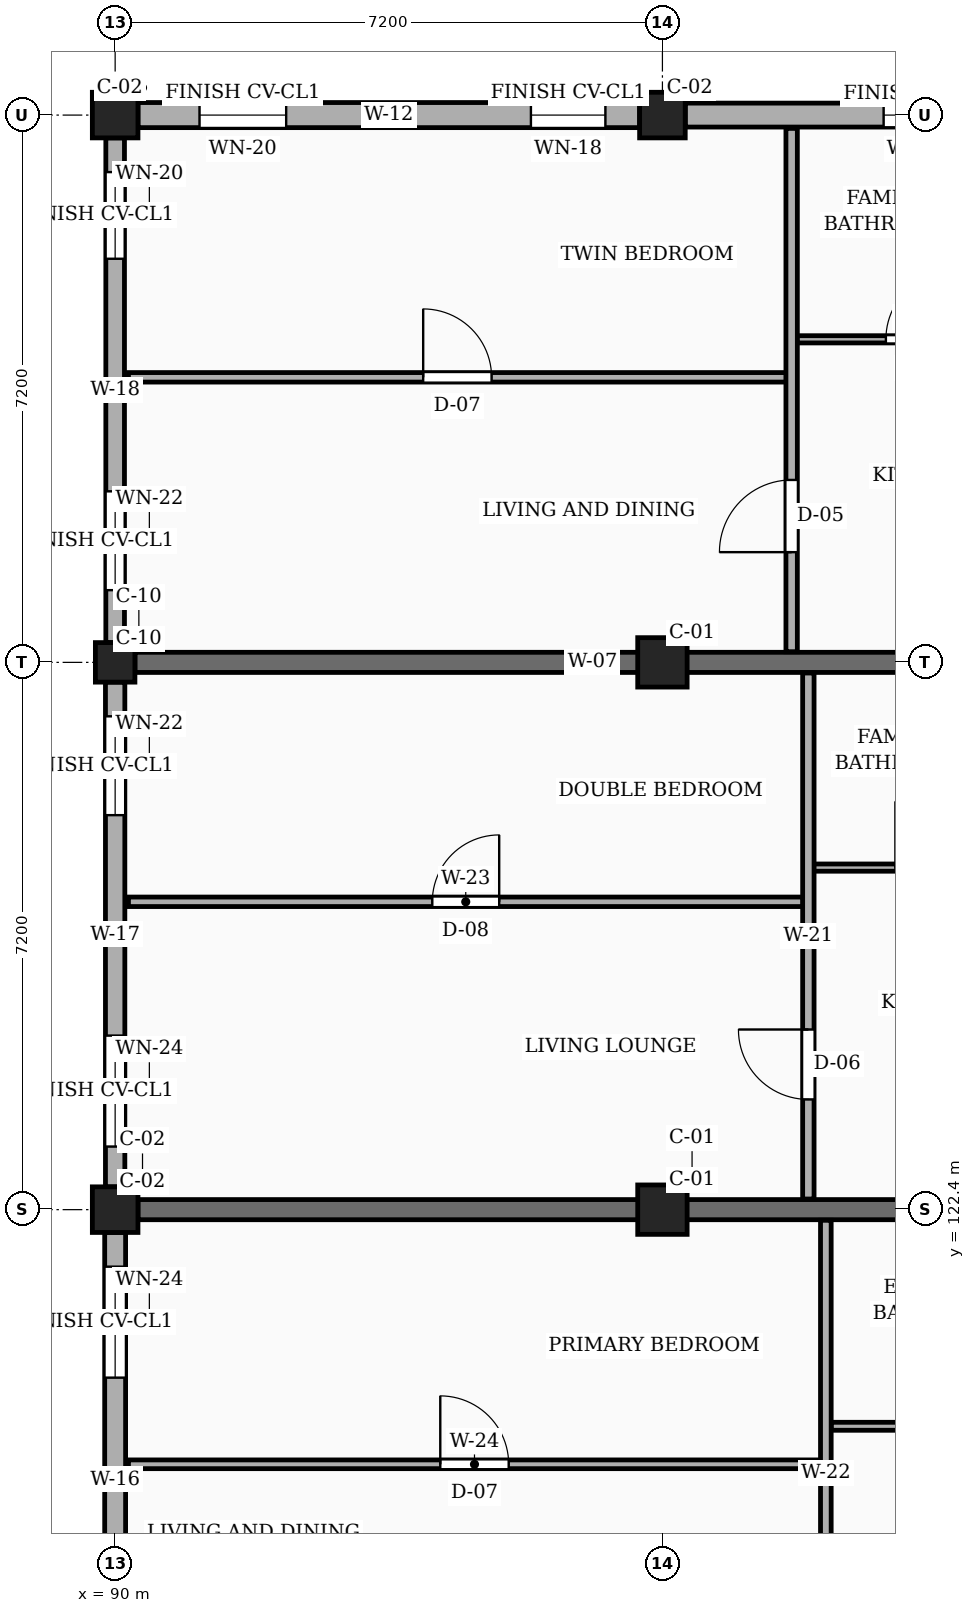
"""IFC4 building model, lengths in metres.
Left out: names, types, materials, properties, quantities, classifications, styles, units other than length and angle.
Written with IfcOpenShell. Run it as: python <this file> out.ifc"""

import sys

from ifc_helpers import new_model, si_unit, direction, frame, frame_2d, origin, origin_2d, place, context, subcontext, project, spatial, rectangle, circle, extrude, element, fill, save


model = new_model("IFC4")
c1 = context("Model", 3, precision=1e-05, world=origin(), true_north=direction((0.0, 1.0)))
c2 = subcontext(c1, "Body", "Model", "MODEL_VIEW")
j1 = project(units=[si_unit("LENGTHUNIT", "METRE"), si_unit("PLANEANGLEUNIT", "RADIAN")], contexts=[c1])
p1 = place(None, origin())
s1 = spatial("IfcSite", under=j1, at=p1, CompositionType="ELEMENT")
p2 = place(p1, origin())
s2 = spatial("IfcBuilding", under=s1, at=p2, CompositionType="ELEMENT")
p3 = place(p2, origin())
s3 = spatial("IfcBuildingStorey", under=s2, at=p3, CompositionType="ELEMENT", Elevation=0.0)
p4 = place(p3, frame((90.0, 122.4, 0.0), z_axis=(0.0, 0.0, 1.0), x_axis=(1.0, 0.0, 0.0)))
e1 = element("IfcColumn", 1, at=p4, inside=s3, PredefinedType="COLUMN", context=c2, shape_type="SweptSolid", body=[
    extrude(rectangle(XDim=0.6, YDim=0.6, at=origin_2d()), origin(), (0.0, 0.0, 1.0), 4.5),
])
p5 = place(p3, frame((90.0, 129.6, 0.0), z_axis=(0.0, 0.0, 1.0), x_axis=(1.0, 0.0, 0.0)))
e2 = element("IfcColumn", 2, at=p5, inside=s3, PredefinedType="COLUMN", context=c2, shape_type="SweptSolid", body=[
    extrude(circle(Radius=0.26, at=origin_2d()), origin(), (0.0, 0.0, 1.0), 4.5),
])
p6 = place(p3, frame((90.0, 136.8, 0.0), z_axis=(0.0, 0.0, 1.0), x_axis=(1.0, 0.0, 0.0)))
e3 = element("IfcColumn", 3, at=p6, inside=s3, PredefinedType="COLUMN", context=c2, shape_type="SweptSolid", body=[
    extrude(rectangle(XDim=0.6, YDim=0.6, at=origin_2d()), origin(), (0.0, 0.0, 1.0), 4.5),
])
for number, where, z_axis, x_axis in (
    (4, (97.2, 122.4, 0.0), (0.0, 0.0, 1.0), (1.0, 0.0, 0.0)),
    (5, (97.2, 129.6, 0.0), (0.0, 0.0, 1.0), (1.0, 0.0, 0.0)),
):
    element("IfcColumn", number, at=place(p3, frame(where, z_axis=z_axis, x_axis=x_axis)), inside=s3, PredefinedType="COLUMN", context=c2, shape_type="SweptSolid", body=[
        extrude(rectangle(XDim=0.65, YDim=0.65, at=origin_2d()), origin(), (0.0, 0.0, 1.0), 4.5),
    ])
p7 = place(p3, frame((97.2, 136.8, 0.0), z_axis=(0.0, 0.0, 1.0), x_axis=(1.0, 0.0, 0.0)))
e6 = element("IfcColumn", 6, at=p7, inside=s3, PredefinedType="COLUMN", context=c2, shape_type="SweptSolid", body=[
    extrude(rectangle(XDim=0.6, YDim=0.6, at=origin_2d()), origin(), (0.0, 0.0, 1.0), 4.5),
])
p8 = place(p3, frame((90.3, 122.4, 0.0), z_axis=(0.0, 0.0, 1.0), x_axis=(1.0, 0.0, 0.0)))
e7 = element("IfcWall", 7, at=p8, inside=s3, PredefinedType="SOLIDWALL", context=c2, shape_type="SweptSolid", body=[
    extrude(rectangle(XDim=12.0, YDim=0.265, at=frame_2d((6.0, 0.0))), origin(), (0.0, 0.0, 1.0), 3.54),
])
p9 = place(p3, frame((90.26, 129.6, 0.0), z_axis=(0.0, 0.0, 1.0), x_axis=(1.0, 0.0, 0.0)))
e8 = element("IfcWall", 8, at=p9, inside=s3, PredefinedType="SOLIDWALL", context=c2, shape_type="SweptSolid", body=[
    extrude(rectangle(XDim=12.04, YDim=0.265, at=frame_2d((6.02, 0.0))), origin(), (0.0, 0.0, 1.0), 3.54),
])
p10 = place(p3, frame((104.1, 136.8, 0.0), z_axis=(0.0, 0.0, 1.0), x_axis=(-1.0, 0.0, 0.0)))
e9 = element("IfcWall", 9, at=p10, inside=s3, PredefinedType="SOLIDWALL", context=c2, shape_type="SweptSolid", body=[
    extrude(rectangle(XDim=6.6, YDim=0.315, at=frame_2d((3.3, 0.0))), origin(), (0.0, 0.0, 1.0), 3.81),
])
p11 = place(p10, frame((0.45, 0.0, 0.78)))
e10 = element("IfcOpeningElement", 10, at=p11, cuts=e9, PredefinedType="OPENING", context=c2, shape_type="SweptSolid", body=[
    extrude(rectangle(XDim=1.04, YDim=1.26, at=frame_2d((0.52, 0.63))), frame((0.0, 0.167, 0.0), z_axis=(0.0, -1.0, 0.0), x_axis=(1.0, 0.0, 0.0)), (0.0, 0.0, 1.0), 0.335),
])
p12 = place(p10, frame((3.01, 0.0, 0.78)))
e11 = element("IfcOpeningElement", 11, at=p12, cuts=e9, PredefinedType="OPENING", context=c2, shape_type="SweptSolid", body=[
    extrude(rectangle(XDim=0.98, YDim=1.36, at=frame_2d((0.49, 0.68))), frame((0.0, 0.167, 0.0), z_axis=(0.0, -1.0, 0.0), x_axis=(1.0, 0.0, 0.0)), (0.0, 0.0, 1.0), 0.335),
])
p13 = place(p3, frame((96.9, 136.8, 0.0), z_axis=(0.0, 0.0, 1.0), x_axis=(-1.0, 0.0, 0.0)))
e12 = element("IfcWall", 12, at=p13, inside=s3, PredefinedType="SOLIDWALL", context=c2, shape_type="SweptSolid", body=[
    extrude(rectangle(XDim=6.6, YDim=0.33, at=frame_2d((3.3, 0.0))), origin(), (0.0, 0.0, 1.0), 3.81),
])
p14 = place(p13, frame((0.45, 0.0, 0.78)))
e13 = element("IfcOpeningElement", 13, at=p14, cuts=e12, PredefinedType="OPENING", context=c2, shape_type="SweptSolid", body=[
    extrude(rectangle(XDim=0.98, YDim=1.36, at=frame_2d((0.49, 0.68))), frame((0.0, 0.175, 0.0), z_axis=(0.0, -1.0, 0.0), x_axis=(1.0, 0.0, 0.0)), (0.0, 0.0, 1.0), 0.35),
])
p15 = place(p13, frame((4.65, 0.0, 0.78)))
e14 = element("IfcOpeningElement", 14, at=p15, cuts=e12, PredefinedType="OPENING", context=c2, shape_type="SweptSolid", body=[
    extrude(rectangle(XDim=1.14, YDim=1.36, at=frame_2d((0.57, 0.68))), frame((0.0, 0.175, 0.0), z_axis=(0.0, -1.0, 0.0), x_axis=(1.0, 0.0, 0.0)), (0.0, 0.0, 1.0), 0.35),
])
p16 = place(p3, frame((90.0, 136.5, 0.0), z_axis=(0.0, 0.0, 1.0), x_axis=(0.0, -1.0, 0.0)))
e15 = element("IfcWall", 15, at=p16, inside=s3, PredefinedType="SOLIDWALL", context=c2, shape_type="SweptSolid", body=[
    extrude(rectangle(XDim=6.64, YDim=0.245, at=frame_2d((3.32, 0.0))), origin(), (0.0, 0.0, 1.0), 3.81),
])
p17 = place(p16, frame((0.45, 0.0, 0.78)))
e16 = element("IfcOpeningElement", 16, at=p17, cuts=e15, PredefinedType="OPENING", context=c2, shape_type="SweptSolid", body=[
    extrude(rectangle(XDim=1.14, YDim=1.36, at=frame_2d((0.57, 0.68))), frame((0.0, 0.133, 0.0), z_axis=(0.0, -1.0, 0.0), x_axis=(1.0, 0.0, 0.0)), (0.0, 0.0, 1.0), 0.265),
])
p18 = place(p16, frame((4.65, 0.0, 0.78)))
e17 = element("IfcOpeningElement", 17, at=p18, cuts=e15, PredefinedType="OPENING", context=c2, shape_type="SweptSolid", body=[
    extrude(rectangle(XDim=1.3, YDim=1.36, at=frame_2d((0.65, 0.68))), frame((0.0, 0.133, 0.0), z_axis=(0.0, -1.0, 0.0), x_axis=(1.0, 0.0, 0.0)), (0.0, 0.0, 1.0), 0.265),
])
p19 = place(p3, frame((90.0, 129.34, 0.0), z_axis=(0.0, 0.0, 1.0), x_axis=(0.0, -1.0, 0.0)))
e18 = element("IfcWall", 18, at=p19, inside=s3, PredefinedType="SOLIDWALL", context=c2, shape_type="SweptSolid", body=[
    extrude(rectangle(XDim=6.64, YDim=0.255, at=frame_2d((3.32, 0.0))), origin(), (0.0, 0.0, 1.0), 3.81),
])
p20 = place(p19, frame((0.45, 0.0, 0.78)))
e19 = element("IfcOpeningElement", 19, at=p20, cuts=e18, PredefinedType="OPENING", context=c2, shape_type="SweptSolid", body=[
    extrude(rectangle(XDim=1.3, YDim=1.36, at=frame_2d((0.65, 0.68))), frame((0.0, 0.137, 0.0), z_axis=(0.0, -1.0, 0.0), x_axis=(1.0, 0.0, 0.0)), (0.0, 0.0, 1.0), 0.275),
])
p21 = place(p19, frame((4.65, 0.0, 0.78)))
e20 = element("IfcOpeningElement", 20, at=p21, cuts=e18, PredefinedType="OPENING", context=c2, shape_type="SweptSolid", body=[
    extrude(rectangle(XDim=1.46, YDim=1.36, at=frame_2d((0.73, 0.68))), frame((0.0, 0.137, 0.0), z_axis=(0.0, -1.0, 0.0), x_axis=(1.0, 0.0, 0.0)), (0.0, 0.0, 1.0), 0.275),
])
p22 = place(p3, frame((90.0, 122.1, 0.0), z_axis=(0.0, 0.0, 1.0), x_axis=(0.0, -1.0, 0.0)))
e21 = element("IfcWall", 21, at=p22, inside=s3, PredefinedType="SOLIDWALL", context=c2, shape_type="SweptSolid", body=[
    extrude(rectangle(XDim=6.6, YDim=0.275, at=frame_2d((3.3, 0.0))), origin(), (0.0, 0.0, 1.0), 3.81),
])
p23 = place(p22, frame((0.45, 0.0, 0.78)))
e22 = element("IfcOpeningElement", 22, at=p23, cuts=e21, PredefinedType="OPENING", context=c2, shape_type="SweptSolid", body=[
    extrude(rectangle(XDim=1.46, YDim=1.36, at=frame_2d((0.73, 0.68))), frame((0.0, 0.147, 0.0), z_axis=(0.0, -1.0, 0.0), x_axis=(1.0, 0.0, 0.0)), (0.0, 0.0, 1.0), 0.295),
])
p24 = place(p22, frame((4.65, 0.0, 0.78)))
e23 = element("IfcOpeningElement", 23, at=p24, cuts=e21, PredefinedType="OPENING", context=c2, shape_type="SweptSolid", body=[
    extrude(rectangle(XDim=1.05, YDim=1.44, at=frame_2d((0.525, 0.72))), frame((0.0, 0.147, 0.0), z_axis=(0.0, -1.0, 0.0), x_axis=(1.0, 0.0, 0.0)), (0.0, 0.0, 1.0), 0.295),
])
p25 = place(p3, frame((90.175, 119.05, 0.0), z_axis=(0.0, 0.0, 1.0), x_axis=(1.0, 0.0, 0.0)))
e24 = element("IfcWall", 24, at=p25, inside=s3, PredefinedType="PARTITIONING", context=c2, shape_type="SweptSolid", body=[
    extrude(rectangle(XDim=9.105, YDim=0.115, at=frame_2d((4.552, 0.0))), origin(), (0.0, 0.0, 1.0), 3.675),
])
p26 = place(p25, frame((4.103, 0.0, 0.0)))
e25 = element("IfcOpeningElement", 25, at=p26, cuts=e24, PredefinedType="OPENING", context=c2, shape_type="SweptSolid", body=[
    extrude(rectangle(XDim=0.9, YDim=2.1, at=frame_2d((0.45, 1.05))), frame((0.0, 0.067, 0.0), z_axis=(0.0, -1.0, 0.0), x_axis=(1.0, 0.0, 0.0)), (0.0, 0.0, 1.0), 0.135),
])
p27 = place(p3, frame((99.42, 119.55, 0.0), z_axis=(0.0, 0.0, 1.0), x_axis=(1.0, 0.0, 0.0)))
e26 = element("IfcWall", 26, at=p27, inside=s3, PredefinedType="PARTITIONING", context=c2, shape_type="SweptSolid", body=[
    extrude(rectangle(XDim=2.79, YDim=0.105, at=frame_2d((1.395, 0.0))), origin(), (0.0, 0.0, 1.0), 3.675),
])
p28 = place(p27, frame((0.945, 0.0, 0.0)))
e27 = element("IfcOpeningElement", 27, at=p28, cuts=e26, PredefinedType="OPENING", context=c2, shape_type="SweptSolid", body=[
    extrude(rectangle(XDim=0.9, YDim=2.05, at=frame_2d((0.45, 1.025))), frame((0.0, 0.062, 0.0), z_axis=(0.0, -1.0, 0.0), x_axis=(1.0, 0.0, 0.0)), (0.0, 0.0, 1.0), 0.125),
])
p29 = place(p3, frame((99.35, 115.34, 0.0), z_axis=(0.0, 0.0, 1.0), x_axis=(0.0, 1.0, 0.0)))
e28 = element("IfcWall", 28, at=p29, inside=s3, PredefinedType="PARTITIONING", context=c2, shape_type="SweptSolid", body=[
    extrude(rectangle(XDim=6.92, YDim=0.14, at=frame_2d((3.46, 0.0))), origin(), (0.0, 0.0, 1.0), 3.675),
])
p30 = place(p29, frame((1.31, 0.0, 0.0)))
e29 = element("IfcOpeningElement", 29, at=p30, cuts=e28, PredefinedType="OPENING", context=c2, shape_type="SweptSolid", body=[
    extrude(rectangle(XDim=0.95, YDim=2.1, at=frame_2d((0.475, 1.05))), frame((0.0, 0.08, 0.0), z_axis=(0.0, -1.0, 0.0), x_axis=(1.0, 0.0, 0.0)), (0.0, 0.0, 1.0), 0.16),
])
p31 = place(p3, frame((90.175, 126.45, 0.0), z_axis=(0.0, 0.0, 1.0), x_axis=(1.0, 0.0, 0.0)))
e30 = element("IfcWall", 30, at=p31, inside=s3, PredefinedType="PARTITIONING", context=c2, shape_type="SweptSolid", body=[
    extrude(rectangle(XDim=8.875, YDim=0.125, at=frame_2d((4.438, 0.0))), origin(), (0.0, 0.0, 1.0), 3.675),
])
p32 = place(p31, frame((3.998, 0.0, 0.0)))
e31 = element("IfcOpeningElement", 31, at=p32, cuts=e30, PredefinedType="OPENING", context=c2, shape_type="SweptSolid", body=[
    extrude(rectangle(XDim=0.88, YDim=2.08, at=frame_2d((0.44, 1.04))), frame((0.0, 0.073, 0.0), z_axis=(0.0, -1.0, 0.0), x_axis=(1.0, 0.0, 0.0)), (0.0, 0.0, 1.0), 0.145),
])
p33 = place(p3, frame((99.19, 126.9, 0.0), z_axis=(0.0, 0.0, 1.0), x_axis=(1.0, 0.0, 0.0)))
e32 = element("IfcWall", 32, at=p33, inside=s3, PredefinedType="PARTITIONING", context=c2, shape_type="SweptSolid", body=[
    extrude(rectangle(XDim=3.02, YDim=0.095, at=frame_2d((1.51, 0.0))), origin(), (0.0, 0.0, 1.0), 3.675),
])
p34 = place(p33, frame((1.075, 0.0, 0.0)))
e33 = element("IfcOpeningElement", 33, at=p34, cuts=e32, PredefinedType="OPENING", context=c2, shape_type="SweptSolid", body=[
    extrude(rectangle(XDim=0.87, YDim=2.05, at=frame_2d((0.435, 1.025))), frame((0.0, 0.058, 0.0), z_axis=(0.0, -1.0, 0.0), x_axis=(1.0, 0.0, 0.0)), (0.0, 0.0, 1.0), 0.115),
])
p35 = place(p3, frame((99.12, 122.54, 0.0), z_axis=(0.0, 0.0, 1.0), x_axis=(0.0, 1.0, 0.0)))
e34 = element("IfcWall", 34, at=p35, inside=s3, PredefinedType="PARTITIONING", context=c2, shape_type="SweptSolid", body=[
    extrude(rectangle(XDim=6.92, YDim=0.15, at=frame_2d((3.46, 0.0))), origin(), (0.0, 0.0, 1.0), 3.675),
])
p36 = place(p35, frame((1.31, 0.0, 0.0)))
e35 = element("IfcOpeningElement", 35, at=p36, cuts=e34, PredefinedType="OPENING", context=c2, shape_type="SweptSolid", body=[
    extrude(rectangle(XDim=0.92, YDim=2.1, at=frame_2d((0.46, 1.05))), frame((0.0, 0.085, 0.0), z_axis=(0.0, -1.0, 0.0), x_axis=(1.0, 0.0, 0.0)), (0.0, 0.0, 1.0), 0.17),
])
p37 = place(p3, frame((90.175, 133.35, 0.0), z_axis=(0.0, 0.0, 1.0), x_axis=(1.0, 0.0, 0.0)))
e36 = element("IfcWall", 36, at=p37, inside=s3, PredefinedType="PARTITIONING", context=c2, shape_type="SweptSolid", body=[
    extrude(rectangle(XDim=8.655, YDim=0.125, at=frame_2d((4.328, 0.0))), origin(), (0.0, 0.0, 1.0), 3.675),
])
p38 = place(p37, frame((3.877, 0.0, 0.0)))
e37 = element("IfcOpeningElement", 37, at=p38, cuts=e36, PredefinedType="OPENING", context=c2, shape_type="SweptSolid", body=[
    extrude(rectangle(XDim=0.9, YDim=2.1, at=frame_2d((0.45, 1.05))), frame((0.0, 0.073, 0.0), z_axis=(0.0, -1.0, 0.0), x_axis=(1.0, 0.0, 0.0)), (0.0, 0.0, 1.0), 0.145),
])
p39 = place(p3, frame((98.97, 133.85, 0.0), z_axis=(0.0, 0.0, 1.0), x_axis=(1.0, 0.0, 0.0)))
e38 = element("IfcWall", 38, at=p39, inside=s3, PredefinedType="PARTITIONING", context=c2, shape_type="SweptSolid", body=[
    extrude(rectangle(XDim=3.24, YDim=0.095, at=frame_2d((1.62, 0.0))), origin(), (0.0, 0.0, 1.0), 3.675),
])
p40 = place(p39, frame((1.17, 0.0, 0.0)))
e39 = element("IfcOpeningElement", 39, at=p40, cuts=e38, PredefinedType="OPENING", context=c2, shape_type="SweptSolid", body=[
    extrude(rectangle(XDim=0.9, YDim=2.05, at=frame_2d((0.45, 1.025))), frame((0.0, 0.058, 0.0), z_axis=(0.0, -1.0, 0.0), x_axis=(1.0, 0.0, 0.0)), (0.0, 0.0, 1.0), 0.115),
])
p41 = place(p3, frame((98.9, 129.74, 0.0), z_axis=(0.0, 0.0, 1.0), x_axis=(0.0, 1.0, 0.0)))
e40 = element("IfcWall", 40, at=p41, inside=s3, PredefinedType="PARTITIONING", context=c2, shape_type="SweptSolid", body=[
    extrude(rectangle(XDim=6.885, YDim=0.15, at=frame_2d((3.442, 0.0))), origin(), (0.0, 0.0, 1.0), 3.675),
])
p42 = place(p41, frame((1.31, 0.0, 0.0)))
e41 = element("IfcOpeningElement", 41, at=p42, cuts=e40, PredefinedType="OPENING", context=c2, shape_type="SweptSolid", body=[
    extrude(rectangle(XDim=0.95, YDim=2.1, at=frame_2d((0.475, 1.05))), frame((0.0, 0.085, 0.0), z_axis=(0.0, -1.0, 0.0), x_axis=(1.0, 0.0, 0.0)), (0.0, 0.0, 1.0), 0.17),
])
p43 = place(p12, origin())
e42 = element("IfcWindow", 42, at=p43, inside=s3, PartitioningType="SINGLE_PANEL", PredefinedType="WINDOW", context=c2, shape_type="SweptSolid", body=[
    extrude(rectangle(XDim=0.98, YDim=1.36, at=frame_2d((0.49, 0.68))), frame((0.0, 0.03, 0.0), z_axis=(0.0, -1.0, 0.0), x_axis=(1.0, 0.0, 0.0)), (0.0, 0.0, 1.0), 0.06),
])
fill(e11, e42)
p44 = place(p14, origin())
e43 = element("IfcWindow", 43, at=p44, inside=s3, PartitioningType="SINGLE_PANEL", PredefinedType="WINDOW", context=c2, shape_type="SweptSolid", body=[
    extrude(rectangle(XDim=0.98, YDim=1.36, at=frame_2d((0.49, 0.68))), frame((0.0, 0.03, 0.0), z_axis=(0.0, -1.0, 0.0), x_axis=(1.0, 0.0, 0.0)), (0.0, 0.0, 1.0), 0.06),
])
fill(e13, e43)
p45 = place(p15, origin())
e44 = element("IfcWindow", 44, at=p45, inside=s3, PartitioningType="SINGLE_PANEL", PredefinedType="WINDOW", context=c2, shape_type="SweptSolid", body=[
    extrude(rectangle(XDim=1.14, YDim=1.36, at=frame_2d((0.57, 0.68))), frame((0.0, 0.03, 0.0), z_axis=(0.0, -1.0, 0.0), x_axis=(1.0, 0.0, 0.0)), (0.0, 0.0, 1.0), 0.06),
])
fill(e14, e44)
p46 = place(p17, origin())
e45 = element("IfcWindow", 45, at=p46, inside=s3, PartitioningType="SINGLE_PANEL", PredefinedType="WINDOW", context=c2, shape_type="SweptSolid", body=[
    extrude(rectangle(XDim=1.14, YDim=1.36, at=frame_2d((0.57, 0.68))), frame((0.0, 0.03, 0.0), z_axis=(0.0, -1.0, 0.0), x_axis=(1.0, 0.0, 0.0)), (0.0, 0.0, 1.0), 0.06),
])
fill(e16, e45)
p47 = place(p18, origin())
e46 = element("IfcWindow", 46, at=p47, inside=s3, PartitioningType="SINGLE_PANEL", PredefinedType="WINDOW", context=c2, shape_type="SweptSolid", body=[
    extrude(rectangle(XDim=1.3, YDim=1.36, at=frame_2d((0.65, 0.68))), frame((0.0, 0.03, 0.0), z_axis=(0.0, -1.0, 0.0), x_axis=(1.0, 0.0, 0.0)), (0.0, 0.0, 1.0), 0.06),
])
fill(e17, e46)
p48 = place(p20, origin())
e47 = element("IfcWindow", 47, at=p48, inside=s3, PartitioningType="SINGLE_PANEL", PredefinedType="WINDOW", context=c2, shape_type="SweptSolid", body=[
    extrude(rectangle(XDim=1.3, YDim=1.36, at=frame_2d((0.65, 0.68))), frame((0.0, 0.03, 0.0), z_axis=(0.0, -1.0, 0.0), x_axis=(1.0, 0.0, 0.0)), (0.0, 0.0, 1.0), 0.06),
])
fill(e19, e47)
p49 = place(p21, origin())
e48 = element("IfcWindow", 48, at=p49, inside=s3, PartitioningType="SINGLE_PANEL", PredefinedType="WINDOW", context=c2, shape_type="SweptSolid", body=[
    extrude(rectangle(XDim=1.46, YDim=1.36, at=frame_2d((0.73, 0.68))), frame((0.0, 0.03, 0.0), z_axis=(0.0, -1.0, 0.0), x_axis=(1.0, 0.0, 0.0)), (0.0, 0.0, 1.0), 0.06),
])
fill(e20, e48)
p50 = place(p23, origin())
e49 = element("IfcWindow", 49, at=p50, inside=s3, PartitioningType="SINGLE_PANEL", PredefinedType="WINDOW", context=c2, shape_type="SweptSolid", body=[
    extrude(rectangle(XDim=1.46, YDim=1.36, at=frame_2d((0.73, 0.68))), frame((0.0, 0.03, 0.0), z_axis=(0.0, -1.0, 0.0), x_axis=(1.0, 0.0, 0.0)), (0.0, 0.0, 1.0), 0.06),
])
fill(e22, e49)
p51 = place(p26, origin())
e50 = element("IfcDoor", 50, at=p51, inside=s3, OperationType="SINGLE_SWING_LEFT", PredefinedType="DOOR", context=c2, shape_type="SweptSolid", body=[
    extrude(rectangle(XDim=0.9, YDim=2.1, at=frame_2d((0.45, 1.05))), frame((0.0, 0.025, 0.0), z_axis=(0.0, -1.0, 0.0), x_axis=(1.0, 0.0, 0.0)), (0.0, 0.0, 1.0), 0.05),
])
fill(e25, e50)
p52 = place(p32, origin())
e51 = element("IfcDoor", 51, at=p52, inside=s3, OperationType="SINGLE_SWING_RIGHT", PredefinedType="DOOR", context=c2, shape_type="SweptSolid", body=[
    extrude(rectangle(XDim=0.88, YDim=2.08, at=frame_2d((0.44, 1.04))), frame((0.0, 0.025, 0.0), z_axis=(0.0, -1.0, 0.0), x_axis=(1.0, 0.0, 0.0)), (0.0, 0.0, 1.0), 0.05),
])
fill(e31, e51)
p53 = place(p34, origin())
e52 = element("IfcDoor", 52, at=p53, inside=s3, OperationType="SINGLE_SWING_LEFT", PredefinedType="DOOR", context=c2, shape_type="SweptSolid", body=[
    extrude(rectangle(XDim=0.87, YDim=2.05, at=frame_2d((0.435, 1.025))), frame((0.0, 0.025, 0.0), z_axis=(0.0, -1.0, 0.0), x_axis=(1.0, 0.0, 0.0)), (0.0, 0.0, 1.0), 0.05),
])
fill(e33, e52)
p54 = place(p36, origin())
e53 = element("IfcDoor", 53, at=p54, inside=s3, OperationType="SINGLE_SWING_RIGHT", PredefinedType="DOOR", context=c2, shape_type="SweptSolid", body=[
    extrude(rectangle(XDim=0.92, YDim=2.1, at=frame_2d((0.46, 1.05))), frame((0.0, 0.025, 0.0), z_axis=(0.0, -1.0, 0.0), x_axis=(1.0, 0.0, 0.0)), (0.0, 0.0, 1.0), 0.05),
])
fill(e35, e53)
p55 = place(p38, origin())
e54 = element("IfcDoor", 54, at=p55, inside=s3, OperationType="SINGLE_SWING_LEFT", PredefinedType="DOOR", context=c2, shape_type="SweptSolid", body=[
    extrude(rectangle(XDim=0.9, YDim=2.1, at=frame_2d((0.45, 1.05))), frame((0.0, 0.025, 0.0), z_axis=(0.0, -1.0, 0.0), x_axis=(1.0, 0.0, 0.0)), (0.0, 0.0, 1.0), 0.05),
])
fill(e37, e54)
p56 = place(p40, origin())
e55 = element("IfcDoor", 55, at=p56, inside=s3, OperationType="SINGLE_SWING_RIGHT", PredefinedType="DOOR", context=c2, shape_type="SweptSolid", body=[
    extrude(rectangle(XDim=0.9, YDim=2.05, at=frame_2d((0.45, 1.025))), frame((0.0, 0.025, 0.0), z_axis=(0.0, -1.0, 0.0), x_axis=(1.0, 0.0, 0.0)), (0.0, 0.0, 1.0), 0.05),
])
fill(e39, e55)
p57 = place(p42, origin())
e56 = element("IfcDoor", 56, at=p57, inside=s3, OperationType="SINGLE_SWING_LEFT", PredefinedType="DOOR", context=c2, shape_type="SweptSolid", body=[
    extrude(rectangle(XDim=0.95, YDim=2.1, at=frame_2d((0.475, 1.05))), frame((0.0, 0.025, 0.0), z_axis=(0.0, -1.0, 0.0), x_axis=(1.0, 0.0, 0.0)), (0.0, 0.0, 1.0), 0.05),
])
fill(e41, e56)
save(model, sys.argv[1])
